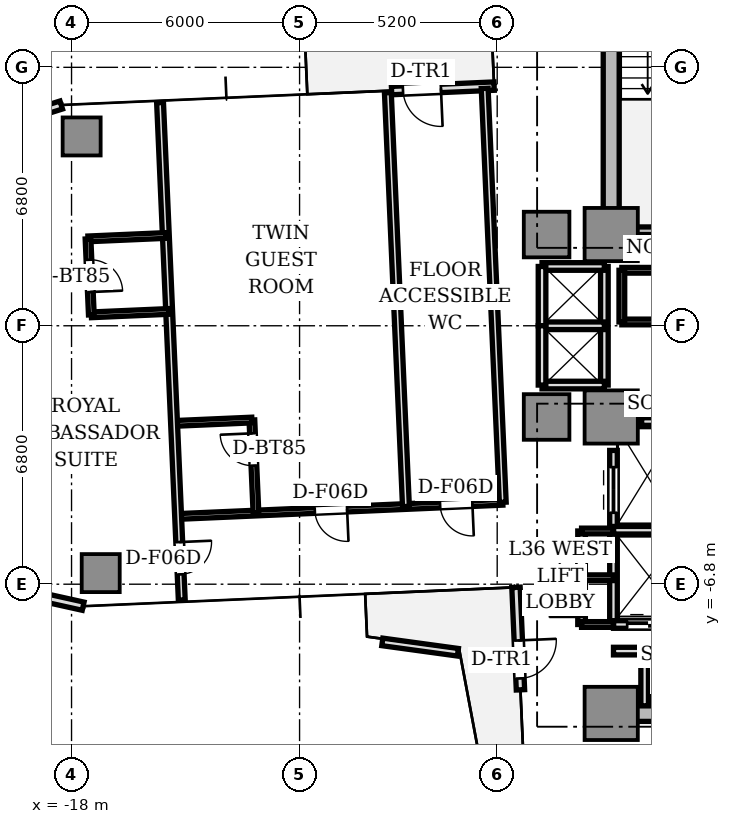
"""IFC4 building model, lengths in metres.
Left out: names, types, materials, properties, quantities, classifications, styles, units other than length and angle.
Written with IfcOpenShell. Run it as: python <this file> out.ifc"""

import sys

from ifc_helpers import new_model, si_unit, direction, frame, frame_2d, origin, origin_2d, place, context, subcontext, project, spatial, rectangle, extrude, source, transform, mapped, element, fill, save


model = new_model("IFC4")
c1 = context("Model", 3, precision=1e-05, world=origin(), true_north=direction((0.0, 1.0)))
c2 = subcontext(c1, "Body", "Model", "MODEL_VIEW")
j1 = project(units=[si_unit("LENGTHUNIT", "METRE"), si_unit("PLANEANGLEUNIT", "RADIAN")], contexts=[c1])
p1 = place(None, origin())
s1 = spatial("IfcSite", under=j1, at=p1, CompositionType="ELEMENT")
p2 = place(p1, origin())
s2 = spatial("IfcBuilding", under=s1, at=p2, CompositionType="ELEMENT")
p3 = place(p2, frame((0.0, 0.0, 131.55)))
s3 = spatial("IfcBuildingStorey", under=s2, at=p3, CompositionType="ELEMENT", Elevation=131.55)
p4 = place(p3, frame((-3.8, 2.85, 0.0), z_axis=(0.0, 0.0, 1.0), x_axis=(0.0, 1.0, 0.0)))
e1 = element("IfcWall", 1, at=p4, inside=s3, PredefinedType="SHEAR", context=c2, shape_type="SweptSolid", body=[
    extrude(rectangle(XDim=6.9, YDim=0.42, at=frame_2d((3.45, 0.0))), origin(), (0.0, 0.0, 1.0), 3.11),
])
p5 = place(p3, frame((-3.55, -10.2, 0.0), z_axis=(0.0, 0.0, 1.0), x_axis=(1.0, 0.0, 0.0)))
e2 = element("IfcWall", 2, at=p5, inside=s3, PredefinedType="SHEAR", context=c2, shape_type="SweptSolid", body=[
    extrude(rectangle(XDim=7.1, YDim=0.42, at=frame_2d((3.55, 0.0))), origin(), (0.0, 0.0, 1.0), 3.11),
])
m1 = source(origin(), c2, "Body", "SweptSolid", [
    extrude(rectangle(XDim=1.4, YDim=1.4, at=origin_2d()), origin(), (0.0, 0.0, 1.0), 3.11),
])
for number, where, z_axis, x_axis in (
    (3, (-3.8, 2.4, 0.0), (0.0, 0.0, 1.0), (1.0, 0.0, 0.0)),
    (4, (-3.8, -2.4, 0.0), (0.0, 0.0, 1.0), (1.0, 0.0, 0.0)),
    (5, (-3.8, -10.2, 0.0), (0.0, 0.0, 1.0), (1.0, 0.0, 0.0)),
):
    element("IfcColumn", number, at=place(p3, frame(where, z_axis=z_axis, x_axis=x_axis)), inside=s3, PredefinedType="COLUMN", context=c2, shape_type="MappedRepresentation", body=[
        mapped(m1, transform((0.0, 0.0, 0.0), scale=1.0)),
    ])
m2 = source(origin(), c2, "Body", "SweptSolid", [
    extrude(rectangle(XDim=1.2, YDim=1.2, at=origin_2d()), origin(), (0.0, 0.0, 1.0), 3.11),
])
for number, where, z_axis, x_axis in (
    (6, (-5.5, 2.4, 0.0), (0.0, 0.0, 1.0), (1.0, 0.0, 0.0)),
    (7, (-5.5, -2.4, 0.0), (0.0, 0.0, 1.0), (1.0, 0.0, 0.0)),
):
    element("IfcColumn", number, at=place(p3, frame(where, z_axis=z_axis, x_axis=x_axis)), inside=s3, PredefinedType="COLUMN", context=c2, shape_type="MappedRepresentation", body=[
        mapped(m2, transform((0.0, 0.0, 0.0), scale=1.0)),
    ])
m3 = source(origin(), c2, "Body", "SweptSolid", [
    extrude(rectangle(XDim=1.0, YDim=1.0, at=origin_2d()), origin(), (0.0, 0.0, 1.0), 3.11),
])
for number, where, z_axis, x_axis in (
    (8, (-17.734, 4.981, 0.0), (0.0, 0.0, 1.0), (1.0, 0.0, 0.0)),
    (9, (-17.232, -6.508, 0.0), (0.0, 0.0, 1.0), (1.0, 0.0, 0.0)),
):
    element("IfcColumn", number, at=place(p3, frame(where, z_axis=z_axis, x_axis=x_axis)), inside=s3, PredefinedType="COLUMN", context=c2, shape_type="MappedRepresentation", body=[
        mapped(m3, transform((0.0, 0.0, 0.0), scale=1.0)),
    ])
p6 = place(p3, frame((-6.882, 6.306, 0.0), z_axis=(0.0, 0.0, 1.0), x_axis=(-0.999045894436, -0.043672655174, 0.0)))
e10 = element("IfcWall", 10, at=p6, inside=s3, PredefinedType="STANDARD", context=c2, shape_type="SweptSolid", body=[
    extrude(rectangle(XDim=2.7, YDim=0.22, at=frame_2d((1.35, 0.0))), origin(), (0.0, 0.0, 1.0), 3.11),
])
p7 = place(p6, frame((1.4, 0.0, 0.0)))
e11 = element("IfcOpeningElement", 11, at=p7, cuts=e10, PredefinedType="OPENING", context=c2, shape_type="SweptSolid", body=[
    extrude(rectangle(XDim=1.0, YDim=2.2, at=frame_2d((0.5, 1.1))), frame((0.0, 0.12, 0.0), z_axis=(0.0, -1.0, 0.0), x_axis=(1.0, 0.0, 0.0)), (0.0, 0.0, 1.0), 0.24),
])
for number, where, z_axis, x_axis in (
    (12, (-18.271, 5.809, 0.0), (0.0, 0.0, 1.0), (-0.954, -0.301, 0.0)),
    (13, (-18.756, -7.144, 0.0), (0.0, 0.0, 1.0), (0.976, -0.217, 0.0)),
):
    element("IfcWall", number, at=place(p3, frame(where, z_axis=z_axis, x_axis=x_axis)), inside=s3, PredefinedType="STANDARD", context=c2, shape_type="SweptSolid", body=[
        extrude(rectangle(XDim=1.087, YDim=0.22, at=frame_2d((0.543, 0.0))), origin(), (0.0, 0.0, 1.0), 3.11),
    ])
p8 = place(p3, frame((-6.306, -6.882, 0.0), z_axis=(0.0, 0.0, 1.0), x_axis=(0.043672655174, -0.999045894436, 0.0)))
e14 = element("IfcWall", 14, at=p8, inside=s3, PredefinedType="STANDARD", context=c2, shape_type="SweptSolid", body=[
    extrude(rectangle(XDim=2.7, YDim=0.22, at=frame_2d((1.35, 0.0))), origin(), (0.0, 0.0, 1.0), 3.11),
])
p9 = place(p8, frame((1.4, 0.0, 0.0)))
e15 = element("IfcOpeningElement", 15, at=p9, cuts=e14, PredefinedType="OPENING", context=c2, shape_type="SweptSolid", body=[
    extrude(rectangle(XDim=1.0, YDim=2.2, at=frame_2d((0.5, 1.1))), frame((0.0, 0.12, 0.0), z_axis=(0.0, -1.0, 0.0), x_axis=(1.0, 0.0, 0.0)), (0.0, 0.0, 1.0), 0.24),
])
p10 = place(p3, frame((-9.823, -8.318, 0.0), z_axis=(0.0, 0.0, 1.0), x_axis=(0.990724749974, -0.135884030663, 0.0)))
e16 = element("IfcWall", 16, at=p10, inside=s3, PredefinedType="PARAPET", context=c2, shape_type="SweptSolid", body=[
    extrude(rectangle(XDim=2.007, YDim=0.2, at=frame_2d((1.003, 0.0))), origin(), (0.0, 0.0, 1.0), 0.65),
])
p11 = place(p3, frame((-3.72, 2.5, 0.0), z_axis=(0.0, 0.0, 1.0), x_axis=(1.0, 0.0, 0.0)))
e17 = element("IfcWall", 17, at=p11, inside=s3, PredefinedType="SOLIDWALL", context=c2, shape_type="SweptSolid", body=[
    extrude(rectangle(XDim=3.72, YDim=0.2, at=frame_2d((1.86, 0.0))), origin(), (0.0, 0.0, 1.0), 3.11),
])
p12 = place(p3, frame((-3.0, -2.52, 0.0), z_axis=(0.0, 0.0, 1.0), x_axis=(1.0, 0.0, 0.0)))
e18 = element("IfcWall", 18, at=p12, inside=s3, PredefinedType="SOLIDWALL", context=c2, shape_type="SweptSolid", body=[
    extrude(rectangle(XDim=1.0, YDim=0.2, at=frame_2d((0.5, 0.0))), origin(), (0.0, 0.0, 1.0), 2.66),
])
p13 = place(p3, frame((-3.74, -5.36, 0.0), z_axis=(0.0, 0.0, 1.0), x_axis=(0.0, 1.0, 0.0)))
e19 = element("IfcWall", 19, at=p13, inside=s3, PredefinedType="SOLIDWALL", context=c2, shape_type="SweptSolid", body=[
    extrude(rectangle(XDim=2.08, YDim=0.2, at=frame_2d((1.04, 0.0))), origin(), (0.0, 0.0, 1.0), 2.66),
])
p14 = place(p13, frame((0.44, 0.0, 0.0)))
e20 = element("IfcOpeningElement", 20, at=p14, cuts=e19, PredefinedType="OPENING", context=c2, shape_type="SweptSolid", body=[
    extrude(rectangle(XDim=1.2, YDim=2.2, at=frame_2d((0.6, 1.1))), frame((0.0, 0.11, 0.0), z_axis=(0.0, -1.0, 0.0), x_axis=(1.0, 0.0, 0.0)), (0.0, 0.0, 1.0), 0.22),
])
p15 = place(p3, frame((-3.74, -7.86, 0.0), z_axis=(0.0, 0.0, 1.0), x_axis=(0.0, 1.0, 0.0)))
e21 = element("IfcWall", 21, at=p15, inside=s3, PredefinedType="SOLIDWALL", context=c2, shape_type="SweptSolid", body=[
    extrude(rectangle(XDim=2.48, YDim=0.2, at=frame_2d((1.24, 0.0))), origin(), (0.0, 0.0, 1.0), 2.66),
])
p16 = place(p3, frame((-3.74, -7.86, 0.0), z_axis=(0.0, 0.0, 1.0), x_axis=(1.0, 0.0, 0.0)))
e22 = element("IfcWall", 22, at=p16, inside=s3, PredefinedType="SOLIDWALL", context=c2, shape_type="SweptSolid", body=[
    extrude(rectangle(XDim=1.84, YDim=0.2, at=frame_2d((0.92, 0.0))), origin(), (0.0, 0.0, 1.0), 2.66),
])
p17 = place(p16, frame((0.36, 0.0, 0.0)))
e23 = element("IfcOpeningElement", 23, at=p17, cuts=e22, PredefinedType="OPENING", context=c2, shape_type="SweptSolid", body=[
    extrude(rectangle(XDim=1.1, YDim=2.2, at=frame_2d((0.55, 1.1))), frame((0.0, 0.11, 0.0), z_axis=(0.0, -1.0, 0.0), x_axis=(1.0, 0.0, 0.0)), (0.0, 0.0, 1.0), 0.22),
])
p18 = place(p3, frame((-3.74, -5.38, 0.0), z_axis=(0.0, 0.0, 1.0), x_axis=(1.0, 0.0, 0.0)))
e24 = element("IfcWall", 24, at=p18, inside=s3, PredefinedType="SOLIDWALL", context=c2, shape_type="SweptSolid", body=[
    extrude(rectangle(XDim=3.69, YDim=0.2, at=frame_2d((1.845, 0.0))), origin(), (0.0, 0.0, 1.0), 2.66),
])
p19 = place(p3, frame((-3.98, -1.56, 0.0), z_axis=(0.0, 0.0, 1.0), x_axis=(0.0, 1.0, 0.0)))
e25 = element("IfcWall", 25, at=p19, inside=s3, PredefinedType="SOLIDWALL", context=c2, shape_type="SweptSolid", body=[
    extrude(rectangle(XDim=3.12, YDim=0.2, at=frame_2d((1.56, 0.0))), origin(), (0.0, 0.0, 1.0), 2.28),
])
for number, where, z_axis, x_axis in (
    (26, (-5.62, 1.56, 0.0), (0.0, 0.0, 1.0), (1.0, 0.0, 0.0)),
    (27, (-5.62, -1.56, 0.0), (0.0, 0.0, 1.0), (1.0, 0.0, 0.0)),
    (28, (-5.62, 0.0, 0.0), (0.0, 0.0, 1.0), (1.0, 0.0, 0.0)),
):
    element("IfcWall", number, at=place(p3, frame(where, z_axis=z_axis, x_axis=x_axis)), inside=s3, PredefinedType="SOLIDWALL", context=c2, shape_type="SweptSolid", body=[
        extrude(rectangle(XDim=1.64, YDim=0.2, at=frame_2d((0.82, 0.0))), origin(), (0.0, 0.0, 1.0), 2.66),
    ])
for number, where, z_axis, x_axis in (
    (29, (-5.62, 0.0, 0.0), (0.0, 0.0, 1.0), (0.0, 1.0, 0.0)),
    (30, (-5.62, -1.56, 0.0), (0.0, 0.0, 1.0), (0.0, 1.0, 0.0)),
):
    element("IfcWall", number, at=place(p3, frame(where, z_axis=z_axis, x_axis=x_axis)), inside=s3, PredefinedType="SOLIDWALL", context=c2, shape_type="SweptSolid", body=[
        extrude(rectangle(XDim=1.56, YDim=0.2, at=frame_2d((0.78, 0.0))), origin(), (0.0, 0.0, 1.0), 2.66),
    ])
p20 = place(p3, frame((-3.74, -8.56, 0.0), z_axis=(0.0, 0.0, 1.0), x_axis=(1.0, 0.0, 0.0)))
e31 = element("IfcWall", 31, at=p20, inside=s3, PredefinedType="SOLIDWALL", context=c2, shape_type="SweptSolid", body=[
    extrude(rectangle(XDim=3.62, YDim=0.2, at=frame_2d((1.81, 0.0))), origin(), (0.0, 0.0, 1.0), 2.66),
])
p21 = place(p20, frame((1.0, 0.0, 0.0)))
e32 = element("IfcOpeningElement", 32, at=p21, cuts=e31, PredefinedType="OPENING", context=c2, shape_type="SweptSolid", body=[
    extrude(rectangle(XDim=0.95, YDim=2.15, at=frame_2d((0.475, 1.075))), frame((0.0, 0.11, 0.0), z_axis=(0.0, -1.0, 0.0), x_axis=(1.0, 0.0, 0.0)), (0.0, 0.0, 1.0), 0.22),
])
p22 = place(p3, frame((-2.92, -10.0, 0.0), z_axis=(0.0, 0.0, 1.0), x_axis=(0.0, 1.0, 0.0)))
e33 = element("IfcWall", 33, at=p22, inside=s3, PredefinedType="SOLIDWALL", context=c2, shape_type="SweptSolid", body=[
    extrude(rectangle(XDim=1.44, YDim=0.2, at=frame_2d((0.72, 0.0))), origin(), (0.0, 0.0, 1.0), 2.66),
])
p23 = place(p3, frame((-4.58, -7.86, 0.0), z_axis=(0.0, 0.0, 1.0), x_axis=(0.0, 1.0, 0.0)))
e34 = element("IfcWall", 34, at=p23, inside=s3, PredefinedType="SOLIDWALL", context=c2, shape_type="SweptSolid", body=[
    extrude(rectangle(XDim=2.46, YDim=0.2, at=frame_2d((1.23, 0.0))), origin(), (0.0, 0.0, 1.0), 2.66),
])
p24 = place(p23, frame((0.2, 0.0, 0.0)))
e35 = element("IfcOpeningElement", 35, at=p24, cuts=e34, PredefinedType="OPENING", context=c2, shape_type="SweptSolid", body=[
    extrude(rectangle(XDim=0.85, YDim=2.1, at=frame_2d((0.425, 1.05))), frame((0.0, 0.11, 0.0), z_axis=(0.0, -1.0, 0.0), x_axis=(1.0, 0.0, 0.0)), (0.0, 0.0, 1.0), 0.22),
])
p25 = place(p23, frame((1.38, 0.0, 0.0)))
e36 = element("IfcOpeningElement", 36, at=p25, cuts=e34, PredefinedType="OPENING", context=c2, shape_type="SweptSolid", body=[
    extrude(rectangle(XDim=0.85, YDim=2.1, at=frame_2d((0.425, 1.05))), frame((0.0, 0.11, 0.0), z_axis=(0.0, -1.0, 0.0), x_axis=(1.0, 0.0, 0.0)), (0.0, 0.0, 1.0), 0.22),
])
for number, where, z_axis, x_axis in (
    (37, (-4.58, -5.4, 0.0), (0.0, 0.0, 1.0), (1.0, 0.0, 0.0)),
    (38, (-4.58, -7.86, 0.0), (0.0, 0.0, 1.0), (1.0, 0.0, 0.0)),
    (39, (-4.58, -6.63, 0.0), (0.0, 0.0, 1.0), (1.0, 0.0, 0.0)),
):
    element("IfcWall", number, at=place(p3, frame(where, z_axis=z_axis, x_axis=x_axis)), inside=s3, PredefinedType="PARTITIONING", context=c2, shape_type="SweptSolid", body=[
        extrude(rectangle(XDim=0.84, YDim=0.15, at=frame_2d((0.42, 0.0))), origin(), (0.0, 0.0, 1.0), 2.66),
    ])
p26 = place(p3, frame((-3.52, 0.1, 0.0), z_axis=(0.0, 0.0, 1.0), x_axis=(1.0, 0.0, 0.0)))
e40 = element("IfcWall", 40, at=p26, inside=s3, PredefinedType="PARTITIONING", context=c2, shape_type="SweptSolid", body=[
    extrude(rectangle(XDim=3.14, YDim=0.15, at=frame_2d((1.57, 0.0))), origin(), (0.0, 0.0, 1.0), 2.66),
])
p27 = place(p3, frame((-3.52, 1.46, 0.0), z_axis=(0.0, 0.0, 1.0), x_axis=(1.0, 0.0, 0.0)))
e41 = element("IfcWall", 41, at=p27, inside=s3, PredefinedType="PARTITIONING", context=c2, shape_type="SweptSolid", body=[
    extrude(rectangle(XDim=3.14, YDim=0.15, at=frame_2d((1.57, 0.0))), origin(), (0.0, 0.0, 1.0), 2.66),
])
p28 = place(p27, frame((1.05, 0.0, 0.0)))
e42 = element("IfcOpeningElement", 42, at=p28, cuts=e41, PredefinedType="OPENING", context=c2, shape_type="SweptSolid", body=[
    extrude(rectangle(XDim=0.85, YDim=2.1, at=frame_2d((0.425, 1.05))), frame((0.0, 0.085, 0.0), z_axis=(0.0, -1.0, 0.0), x_axis=(1.0, 0.0, 0.0)), (0.0, 0.0, 1.0), 0.17),
])
p29 = place(p3, frame((-3.52, 0.1, 0.0), z_axis=(0.0, 0.0, 1.0), x_axis=(0.0, 1.0, 0.0)))
e43 = element("IfcWall", 43, at=p29, inside=s3, PredefinedType="PARTITIONING", context=c2, shape_type="SweptSolid", body=[
    extrude(rectangle(XDim=1.36, YDim=0.15, at=frame_2d((0.68, 0.0))), origin(), (0.0, 0.0, 1.0), 2.28),
])
p30 = place(p3, frame((-6.654, -4.645, 0.0), z_axis=(0.0, 0.0, 1.0), x_axis=(-0.999048925025, -0.043603272887, 0.0)))
e44 = element("IfcWall", 44, at=p30, inside=s3, PredefinedType="PARTITIONING", context=c2, shape_type="SweptSolid", body=[
    extrude(rectangle(XDim=8.55, YDim=0.15, at=frame_2d((4.275, 0.0))), origin(), (0.0, 0.0, 1.0), 2.63),
])
p31 = place(p30, frame((0.8, 0.0, 0.0)))
e45 = element("IfcOpeningElement", 45, at=p31, cuts=e44, PredefinedType="OPENING", context=c2, shape_type="SweptSolid", body=[
    extrude(rectangle(XDim=0.85, YDim=2.1, at=frame_2d((0.425, 1.05))), frame((0.0, 0.085, 0.0), z_axis=(0.0, -1.0, 0.0), x_axis=(1.0, 0.0, 0.0)), (0.0, 0.0, 1.0), 0.17),
])
p32 = place(p30, frame((4.1, 0.0, 0.0)))
e46 = element("IfcOpeningElement", 46, at=p32, cuts=e44, PredefinedType="OPENING", context=c2, shape_type="SweptSolid", body=[
    extrude(rectangle(XDim=0.85, YDim=2.1, at=frame_2d((0.425, 1.05))), frame((0.0, 0.085, 0.0), z_axis=(0.0, -1.0, 0.0), x_axis=(1.0, 0.0, 0.0)), (0.0, 0.0, 1.0), 0.17),
])
p33 = place(p3, frame((-7.129, 6.245, 0.0), z_axis=(0.0, 0.0, 1.0), x_axis=(0.043608291235, -0.999048705988, 0.0)))
e47 = element("IfcWall", 47, at=p33, inside=s3, PredefinedType="PARTITIONING", context=c2, shape_type="SweptSolid", body=[
    extrude(rectangle(XDim=10.9, YDim=0.18, at=frame_2d((5.45, 0.0))), origin(), (0.0, 0.0, 1.0), 2.66),
])
p34 = place(p3, frame((-9.201, -4.756, 0.0), z_axis=(0.0, 0.0, 1.0), x_axis=(-0.043609267053, 0.999048663393, 0.0)))
e48 = element("IfcWall", 48, at=p34, inside=s3, PredefinedType="PARTITIONING", context=c2, shape_type="SweptSolid", body=[
    extrude(rectangle(XDim=10.9, YDim=0.18, at=frame_2d((5.45, 0.0))), origin(), (0.0, 0.0, 1.0), 2.66),
])
p35 = place(p3, frame((-13.147, -4.928, 0.0), z_axis=(0.0, 0.0, 1.0), x_axis=(-0.043644787072, 0.999047112283, 0.0)))
e49 = element("IfcWall", 49, at=p35, inside=s3, PredefinedType="PARTITIONING", context=c2, shape_type="SweptSolid", body=[
    extrude(rectangle(XDim=2.45, YDim=0.15, at=frame_2d((1.225, 0.0))), origin(), (0.0, 0.0, 1.0), 2.66),
])
p36 = place(p35, frame((1.25, 0.0, 0.0)))
e50 = element("IfcOpeningElement", 50, at=p36, cuts=e49, PredefinedType="OPENING", context=c2, shape_type="SweptSolid", body=[
    extrude(rectangle(XDim=0.85, YDim=2.1, at=frame_2d((0.425, 1.05))), frame((0.0, 0.085, 0.0), z_axis=(0.0, -1.0, 0.0), x_axis=(1.0, 0.0, 0.0)), (0.0, 0.0, 1.0), 0.17),
])
p37 = place(p3, frame((-13.254, -2.48, 0.0), z_axis=(0.0, 0.0, 1.0), x_axis=(-0.999049630844, -0.043587097972, 0.0)))
e51 = element("IfcWall", 51, at=p37, inside=s3, PredefinedType="PARTITIONING", context=c2, shape_type="SweptSolid", body=[
    extrude(rectangle(XDim=2.05, YDim=0.15, at=frame_2d((1.025, 0.0))), origin(), (0.0, 0.0, 1.0), 2.63),
])
p38 = place(p3, frame((-15.671, 5.872, 0.0), z_axis=(0.0, 0.0, 1.0), x_axis=(0.043609488494, -0.999048653727, 0.0)))
e52 = element("IfcWall", 52, at=p38, inside=s3, PredefinedType="PARTITIONING", context=c2, shape_type="SweptSolid", body=[
    extrude(rectangle(XDim=13.1, YDim=0.18, at=frame_2d((6.55, 0.0))), origin(), (0.0, 0.0, 1.0), 2.66),
])
p39 = place(p38, frame((11.575, 0.0, 0.0)))
e53 = element("IfcOpeningElement", 53, at=p39, cuts=e52, PredefinedType="OPENING", context=c2, shape_type="SweptSolid", body=[
    extrude(rectangle(XDim=0.85, YDim=2.1, at=frame_2d((0.425, 1.05))), frame((0.0, 0.1, 0.0), z_axis=(0.0, -1.0, 0.0), x_axis=(1.0, 0.0, 0.0)), (0.0, 0.0, 1.0), 0.2),
])
p40 = place(p3, frame((-15.431, 0.377, 0.0), z_axis=(0.0, 0.0, 1.0), x_axis=(-0.999049630844, -0.043587097972, 0.0)))
e54 = element("IfcWall", 54, at=p40, inside=s3, PredefinedType="PARTITIONING", context=c2, shape_type="SweptSolid", body=[
    extrude(rectangle(XDim=2.05, YDim=0.15, at=frame_2d((1.025, 0.0))), origin(), (0.0, 0.0, 1.0), 2.66),
])
p41 = place(p3, frame((-15.518, 2.375, 0.0), z_axis=(0.0, 0.0, 1.0), x_axis=(-0.999044437927, -0.043705961225, 0.0)))
e55 = element("IfcWall", 55, at=p41, inside=s3, PredefinedType="PARTITIONING", context=c2, shape_type="SweptSolid", body=[
    extrude(rectangle(XDim=2.05, YDim=0.15, at=frame_2d((1.025, 0.0))), origin(), (0.0, 0.0, 1.0), 2.63),
])
p42 = place(p3, frame((-17.566, 2.286, 0.0), z_axis=(0.0, 0.0, 1.0), x_axis=(0.043580257179, -0.999049929275, 0.0)))
e56 = element("IfcWall", 56, at=p42, inside=s3, PredefinedType="PARTITIONING", context=c2, shape_type="SweptSolid", body=[
    extrude(rectangle(XDim=2.0, YDim=0.15, at=frame_2d((1.0, 0.0))), origin(), (0.0, 0.0, 1.0), 2.58),
])
p43 = place(p42, frame((0.55, 0.0, 0.0)))
e57 = element("IfcOpeningElement", 57, at=p43, cuts=e56, PredefinedType="OPENING", context=c2, shape_type="SweptSolid", body=[
    extrude(rectangle(XDim=0.85, YDim=2.1, at=frame_2d((0.425, 1.05))), frame((0.0, 0.085, 0.0), z_axis=(0.0, -1.0, 0.0), x_axis=(1.0, 0.0, 0.0)), (0.0, 0.0, 1.0), 0.17),
])
p44 = place(p3, frame((-6.049, -11.625, 0.0), z_axis=(0.0, 0.0, 1.0), x_axis=(0.999047806124, 0.043628901879, 0.0)))
e58 = element("IfcWall", 58, at=p44, inside=s3, PredefinedType="PARTITIONING", context=c2, shape_type="SweptSolid", body=[
    extrude(rectangle(XDim=13.1, YDim=0.15, at=frame_2d((6.55, 0.0))), origin(), (0.0, 0.0, 1.0), 2.66),
])
p45 = place(p44, frame((5.75, 0.0, 0.0)))
e59 = element("IfcOpeningElement", 59, at=p45, cuts=e58, PredefinedType="OPENING", context=c2, shape_type="SweptSolid", body=[
    extrude(rectangle(XDim=1.6, YDim=2.25, at=frame_2d((0.8, 1.125))), frame((0.0, 0.085, 0.0), z_axis=(0.0, -1.0, 0.0), x_axis=(1.0, 0.0, 0.0)), (0.0, 0.0, 1.0), 0.17),
])
m4 = source(origin(), c2, "Body", "SweptSolid", [
    extrude(rectangle(XDim=1.0, YDim=0.05, at=origin_2d()), origin(), (0.0, 0.0, 1.0), 2.2),
])
p46 = place(p7, frame((0.5, 0.0, 0.0)))
e60 = element("IfcDoor", 60, at=p46, inside=s3, OperationType="SINGLE_SWING_LEFT", PredefinedType="DOOR", context=c2, shape_type="MappedRepresentation", body=[
    mapped(m4, transform((0.0, 0.0, 0.0), scale=1.0)),
])
fill(e11, e60)
p47 = place(p9, frame((0.5, 0.0, 0.0)))
e61 = element("IfcDoor", 61, at=p47, inside=s3, OperationType="SINGLE_SWING_LEFT", PredefinedType="DOOR", context=c2, shape_type="MappedRepresentation", body=[
    mapped(m4, transform((0.0, 0.0, 0.0), scale=1.0)),
])
fill(e15, e61)
m5 = source(origin(), c2, "Body", "SweptSolid", [
    extrude(rectangle(XDim=1.2, YDim=0.05, at=origin_2d()), origin(), (0.0, 0.0, 1.0), 2.2),
])
p48 = place(p14, frame((0.6, 0.0, 0.0)))
e62 = element("IfcDoor", 62, at=p48, inside=s3, OperationType="DOUBLE_DOOR_SLIDING", PredefinedType="DOOR", context=c2, shape_type="MappedRepresentation", body=[
    mapped(m5, transform((0.0, 0.0, 0.0), scale=1.0)),
])
fill(e20, e62)
m6 = source(origin(), c2, "Body", "SweptSolid", [
    extrude(rectangle(XDim=1.1, YDim=0.05, at=origin_2d()), origin(), (0.0, 0.0, 1.0), 2.2),
])
p49 = place(p17, frame((0.55, 0.0, 0.0)))
e63 = element("IfcDoor", 63, at=p49, inside=s3, OperationType="DOUBLE_DOOR_SLIDING", PredefinedType="DOOR", context=c2, shape_type="MappedRepresentation", body=[
    mapped(m6, transform((0.0, 0.0, 0.0), scale=1.0)),
])
fill(e23, e63)
m7 = source(origin(), c2, "Body", "SweptSolid", [
    extrude(rectangle(XDim=0.85, YDim=0.05, at=origin_2d()), origin(), (0.0, 0.0, 1.0), 2.1),
])
p50 = place(p24, frame((0.425, 0.0, 0.0)))
e64 = element("IfcDoor", 64, at=p50, inside=s3, OperationType="SINGLE_SWING_LEFT", PredefinedType="DOOR", context=c2, shape_type="MappedRepresentation", body=[
    mapped(m7, transform((0.0, 0.0, 0.0), scale=1.0)),
])
fill(e35, e64)
p51 = place(p25, frame((0.425, 0.0, 0.0)))
e65 = element("IfcDoor", 65, at=p51, inside=s3, OperationType="SINGLE_SWING_RIGHT", PredefinedType="DOOR", context=c2, shape_type="MappedRepresentation", body=[
    mapped(m7, transform((0.0, 0.0, 0.0), scale=1.0)),
])
fill(e36, e65)
p52 = place(p31, frame((0.425, 0.0, 0.0)))
e66 = element("IfcDoor", 66, at=p52, inside=s3, OperationType="SINGLE_SWING_LEFT", PredefinedType="DOOR", context=c2, shape_type="MappedRepresentation", body=[
    mapped(m7, transform((0.0, 0.0, 0.0), scale=1.0)),
])
fill(e45, e66)
p53 = place(p36, frame((0.425, 0.0, 0.0)))
e67 = element("IfcDoor", 67, at=p53, inside=s3, OperationType="SINGLE_SWING_RIGHT", PredefinedType="DOOR", context=c2, shape_type="MappedRepresentation", body=[
    mapped(m7, transform((0.0, 0.0, 0.0), scale=1.0)),
])
fill(e50, e67)
p54 = place(p32, frame((0.425, 0.0, 0.0)))
e68 = element("IfcDoor", 68, at=p54, inside=s3, OperationType="SINGLE_SWING_LEFT", PredefinedType="DOOR", context=c2, shape_type="MappedRepresentation", body=[
    mapped(m7, transform((0.0, 0.0, 0.0), scale=1.0)),
])
fill(e46, e68)
p55 = place(p43, frame((0.425, 0.0, 0.0)))
e69 = element("IfcDoor", 69, at=p55, inside=s3, OperationType="SINGLE_SWING_RIGHT", PredefinedType="DOOR", context=c2, shape_type="MappedRepresentation", body=[
    mapped(m7, transform((0.0, 0.0, 0.0), scale=1.0)),
])
fill(e57, e69)
p56 = place(p39, frame((0.425, 0.0, 0.0)))
e70 = element("IfcDoor", 70, at=p56, inside=s3, OperationType="SINGLE_SWING_LEFT", PredefinedType="DOOR", context=c2, shape_type="MappedRepresentation", body=[
    mapped(m7, transform((0.0, 0.0, 0.0), scale=1.0)),
])
fill(e53, e70)
save(model, sys.argv[1])
